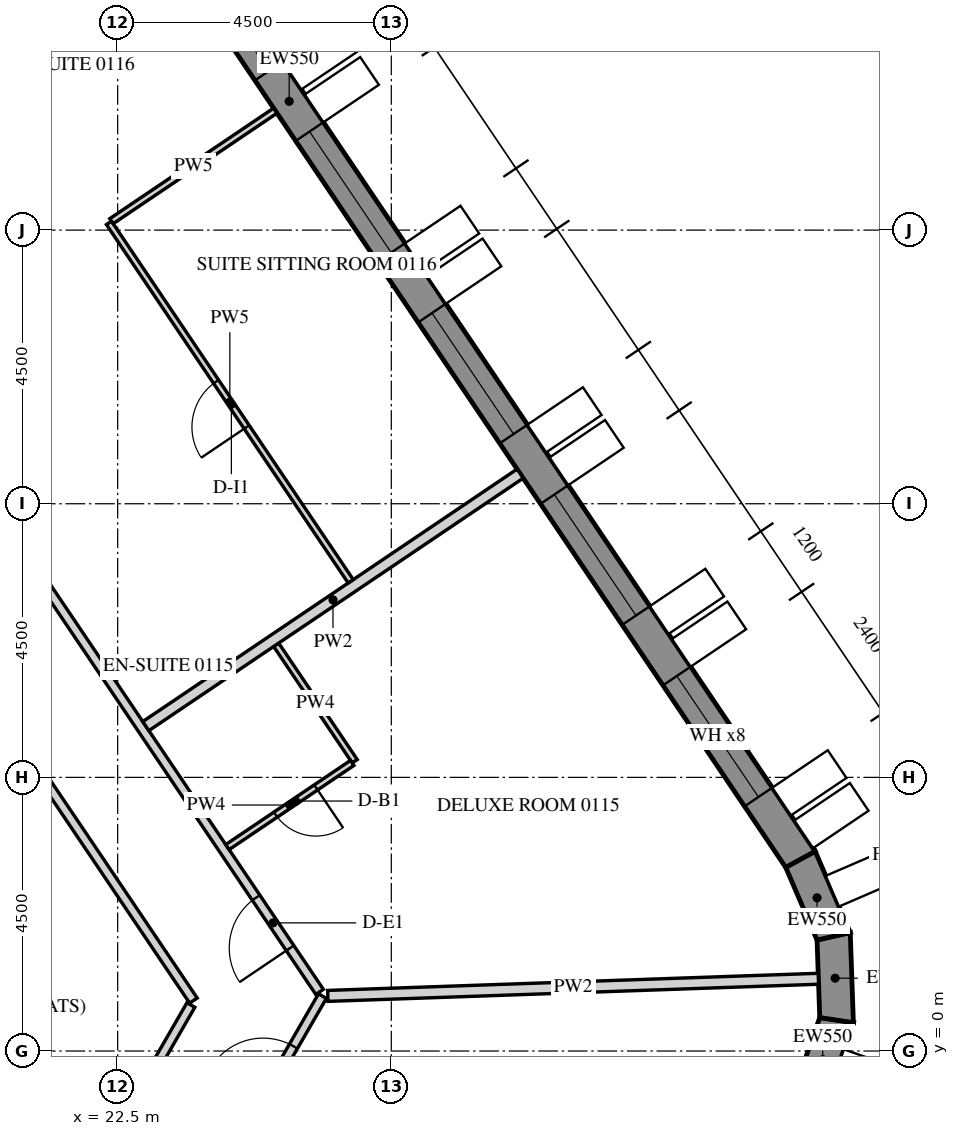
"""IFC4 building model, lengths in metres.
Left out: names, types, materials, properties, quantities, classifications, styles, units other than length and angle.
Written with IfcOpenShell. Run it as: python <this file> out.ifc"""

import sys

from ifc_helpers import new_model, si_unit, direction, frame, frame_2d, origin, place, context, subcontext, project, spatial, polyline, rectangle, outline, extrude, element, fill, save


model = new_model("IFC4")
c1 = context("Model", 3, precision=1e-05, world=origin(), true_north=direction((0.0, 1.0)))
c2 = subcontext(c1, "Body", "Model", "MODEL_VIEW")
j1 = project(units=[si_unit("LENGTHUNIT", "METRE"), si_unit("PLANEANGLEUNIT", "RADIAN")], contexts=[c1])
p1 = place(None, origin())
s1 = spatial("IfcSite", under=j1, at=p1, CompositionType="ELEMENT")
p2 = place(p1, origin())
s2 = spatial("IfcBuilding", under=s1, at=p2, CompositionType="ELEMENT")
p3 = place(p2, frame((0.0, 0.0, 37.5)))
s3 = spatial("IfcBuildingStorey", under=s2, at=p3, CompositionType="ELEMENT", Elevation=37.5)
p4 = place(p3, frame((33.866, -0.792, -0.15), z_axis=(0.0, 0.0, 1.0), x_axis=(0.33111537203, 0.943590276765, 0.0)))
e1 = element("IfcWall", 1, at=p4, inside=s3, PredefinedType="SOLIDWALL", context=c2, shape_type="SweptSolid", body=[
    extrude(outline(polyline([(-0.026, -0.275), (1.431, -0.275), (1.327, 0.275), (0.026, 0.275), (-0.026, -0.275)])), origin(), (0.0, 0.0, 1.0), 3.9),
])
p5 = place(p3, frame((34.323, 0.509, -0.15), z_axis=(0.0, 0.0, 1.0), x_axis=(-0.034876908462, 0.999391615562, 0.0)))
e2 = element("IfcWall", 2, at=p5, inside=s3, PredefinedType="SOLIDWALL", context=c2, shape_type="SweptSolid", body=[
    extrude(outline(polyline([(-0.052, -0.275), (1.431, -0.275), (1.327, 0.275), (0.052, 0.275), (-0.052, -0.275)])), origin(), (0.0, 0.0, 1.0), 3.9),
])
p6 = place(p3, frame((34.274, 1.887, -0.15), z_axis=(0.0, 0.0, 1.0), x_axis=(-0.396161342798, 0.918180913803, 0.0)))
e3 = element("IfcWall", 3, at=p6, inside=s3, PredefinedType="SOLIDWALL", context=c2, shape_type="SweptSolid", body=[
    extrude(outline(polyline([(-0.052, -0.275), (1.405, -0.275), (1.354, 0.275), (0.052, 0.275), (-0.052, -0.275)])), origin(), (0.0, 0.0, 1.0), 3.9),
])
p7 = place(p3, frame((33.728, 3.153, -0.15), z_axis=(0.0, 0.0, 1.0), x_axis=(-0.559192411416, 0.82903790445, 0.0)))
e4 = element("IfcWall", 4, at=p7, inside=s3, PredefinedType="SOLIDWALL", context=c2, shape_type="SweptSolid", body=[
    extrude(outline(polyline([(-0.026, -0.275), (30.093, -0.275), (30.048, 0.275), (0.026, 0.275), (-0.026, -0.275)])), origin(), (0.0, 0.0, 1.0), 3.9),
])
p8 = place(p7, frame((1.236, 0.0, 1.05)))
e5 = element("IfcOpeningElement", 5, at=p8, cuts=e4, PredefinedType="OPENING", context=c2, shape_type="SweptSolid", body=[
    extrude(rectangle(XDim=2.4, YDim=2.4, at=frame_2d((1.2, 1.2))), frame((0.0, 0.285, 0.0), z_axis=(0.0, -1.0, 0.0), x_axis=(1.0, 0.0, 0.0)), (0.0, 0.0, 1.0), 0.57),
])
p9 = place(p7, frame((4.835, 0.0, 1.05)))
e6 = element("IfcOpeningElement", 6, at=p9, cuts=e4, PredefinedType="OPENING", context=c2, shape_type="SweptSolid", body=[
    extrude(rectangle(XDim=2.4, YDim=2.4, at=frame_2d((1.2, 1.2))), frame((0.0, 0.285, 0.0), z_axis=(0.0, -1.0, 0.0), x_axis=(1.0, 0.0, 0.0)), (0.0, 0.0, 1.0), 0.57),
])
p10 = place(p7, frame((8.436, 0.0, 1.05)))
e7 = element("IfcOpeningElement", 7, at=p10, cuts=e4, PredefinedType="OPENING", context=c2, shape_type="SweptSolid", body=[
    extrude(rectangle(XDim=2.4, YDim=2.4, at=frame_2d((1.2, 1.2))), frame((0.0, 0.285, 0.0), z_axis=(0.0, -1.0, 0.0), x_axis=(1.0, 0.0, 0.0)), (0.0, 0.0, 1.0), 0.57),
])
p11 = place(p7, frame((12.035, 0.0, 1.05)))
e8 = element("IfcOpeningElement", 8, at=p11, cuts=e4, PredefinedType="OPENING", context=c2, shape_type="SweptSolid", body=[
    extrude(rectangle(XDim=2.4, YDim=2.4, at=frame_2d((1.2, 1.2))), frame((0.0, 0.285, 0.0), z_axis=(0.0, -1.0, 0.0), x_axis=(1.0, 0.0, 0.0)), (0.0, 0.0, 1.0), 0.57),
])
p12 = place(p7, frame((15.635, 0.0, 1.05)))
e9 = element("IfcOpeningElement", 9, at=p12, cuts=e4, PredefinedType="OPENING", context=c2, shape_type="SweptSolid", body=[
    extrude(rectangle(XDim=2.4, YDim=2.4, at=frame_2d((1.2, 1.2))), frame((0.0, 0.285, 0.0), z_axis=(0.0, -1.0, 0.0), x_axis=(1.0, 0.0, 0.0)), (0.0, 0.0, 1.0), 0.57),
])
p13 = place(p7, frame((19.236, 0.0, 1.05)))
e10 = element("IfcOpeningElement", 10, at=p13, cuts=e4, PredefinedType="OPENING", context=c2, shape_type="SweptSolid", body=[
    extrude(rectangle(XDim=2.4, YDim=2.4, at=frame_2d((1.2, 1.2))), frame((0.0, 0.285, 0.0), z_axis=(0.0, -1.0, 0.0), x_axis=(1.0, 0.0, 0.0)), (0.0, 0.0, 1.0), 0.57),
])
p14 = place(p7, frame((22.835, 0.0, 1.05)))
e11 = element("IfcOpeningElement", 11, at=p14, cuts=e4, PredefinedType="OPENING", context=c2, shape_type="SweptSolid", body=[
    extrude(rectangle(XDim=2.4, YDim=2.4, at=frame_2d((1.2, 1.2))), frame((0.0, 0.285, 0.0), z_axis=(0.0, -1.0, 0.0), x_axis=(1.0, 0.0, 0.0)), (0.0, 0.0, 1.0), 0.57),
])
p15 = place(p7, frame((26.436, 0.0, 1.05)))
e12 = element("IfcOpeningElement", 12, at=p15, cuts=e4, PredefinedType="OPENING", context=c2, shape_type="SweptSolid", body=[
    extrude(rectangle(XDim=2.4, YDim=2.4, at=frame_2d((1.2, 1.2))), frame((0.0, 0.285, 0.0), z_axis=(0.0, -1.0, 0.0), x_axis=(1.0, 0.0, 0.0)), (0.0, 0.0, 1.0), 0.57),
])
p16 = place(p3, frame((13.928, -19.775, 0.0), z_axis=(0.0, 0.0, 1.0), x_axis=(0.50000450071, 0.866022805283, 0.0)))
e13 = element("IfcWall", 13, at=p16, inside=s3, PredefinedType="PARTITIONING", context=c2, shape_type="SweptSolid", body=[
    extrude(rectangle(XDim=23.877, YDim=0.15, at=frame_2d((11.938, 0.0))), origin(), (0.0, 0.0, 1.0), 2.988),
])
p17 = place(p16, frame((8.573, 0.0, 0.0)))
e14 = element("IfcOpeningElement", 14, at=p17, cuts=e13, PredefinedType="OPENING", context=c2, shape_type="SweptSolid", body=[
    extrude(rectangle(XDim=1.0, YDim=2.1, at=frame_2d((0.5, 1.05))), frame((0.0, 0.085, 0.0), z_axis=(0.0, -1.0, 0.0), x_axis=(1.0, 0.0, 0.0)), (0.0, 0.0, 1.0), 0.17),
])
p18 = place(p16, frame((13.022, 0.0, 0.0)))
e15 = element("IfcOpeningElement", 15, at=p18, cuts=e13, PredefinedType="OPENING", context=c2, shape_type="SweptSolid", body=[
    extrude(rectangle(XDim=1.0, YDim=2.1, at=frame_2d((0.5, 1.05))), frame((0.0, 0.085, 0.0), z_axis=(0.0, -1.0, 0.0), x_axis=(1.0, 0.0, 0.0)), (0.0, 0.0, 1.0), 0.17),
])
p19 = place(p16, frame((21.925, 0.0, 0.0)))
e16 = element("IfcOpeningElement", 16, at=p19, cuts=e13, PredefinedType="OPENING", context=c2, shape_type="SweptSolid", body=[
    extrude(rectangle(XDim=1.0, YDim=2.1, at=frame_2d((0.5, 1.05))), frame((0.0, 0.085, 0.0), z_axis=(0.0, -1.0, 0.0), x_axis=(1.0, 0.0, 0.0)), (0.0, 0.0, 1.0), 0.17),
])
p20 = place(p3, frame((25.821, 0.972, 0.0), z_axis=(0.0, 0.0, 1.0), x_axis=(-0.559193816298, 0.829036956845, 0.0)))
e17 = element("IfcWall", 17, at=p20, inside=s3, PredefinedType="PARTITIONING", context=c2, shape_type="SweptSolid", body=[
    extrude(rectangle(XDim=22.002, YDim=0.15, at=frame_2d((11.001, 0.0))), origin(), (0.0, 0.0, 1.0), 2.988),
])
p21 = place(p20, frame((0.869, 0.0, 0.0)))
e18 = element("IfcOpeningElement", 18, at=p21, cuts=e17, PredefinedType="OPENING", context=c2, shape_type="SweptSolid", body=[
    extrude(rectangle(XDim=1.0, YDim=2.1, at=frame_2d((0.5, 1.05))), frame((0.0, 0.085, 0.0), z_axis=(0.0, -1.0, 0.0), x_axis=(1.0, 0.0, 0.0)), (0.0, 0.0, 1.0), 0.17),
])
p22 = place(p20, frame((10.721, 0.0, 0.0)))
e19 = element("IfcOpeningElement", 19, at=p22, cuts=e17, PredefinedType="OPENING", context=c2, shape_type="SweptSolid", body=[
    extrude(rectangle(XDim=1.0, YDim=2.1, at=frame_2d((0.5, 1.05))), frame((0.0, 0.085, 0.0), z_axis=(0.0, -1.0, 0.0), x_axis=(1.0, 0.0, 0.0)), (0.0, 0.0, 1.0), 0.17),
])
p23 = place(p3, frame((18.14, 9.141, 0.0), z_axis=(0.0, 0.0, 1.0), x_axis=(0.55918799196, -0.829040885389, 0.0)))
e20 = element("IfcWall", 20, at=p23, inside=s3, PredefinedType="PARTITIONING", context=c2, shape_type="SweptSolid", body=[
    extrude(rectangle(XDim=10.025, YDim=0.15, at=frame_2d((5.013, 0.0))), origin(), (0.0, 0.0, 1.0), 2.988),
])
p24 = place(p3, frame((23.704, 0.757, 0.0), z_axis=(0.0, 0.0, 1.0), x_axis=(-0.500010297365, -0.866019458516, 0.0)))
e21 = element("IfcWall", 21, at=p24, inside=s3, PredefinedType="PARTITIONING", context=c2, shape_type="SweptSolid", body=[
    extrude(rectangle(XDim=11.429, YDim=0.15, at=frame_2d((5.714, 0.0))), origin(), (0.0, 0.0, 1.0), 2.988),
])
p25 = place(p24, frame((5.264, 0.0, 0.0)))
e22 = element("IfcOpeningElement", 22, at=p25, cuts=e21, PredefinedType="OPENING", context=c2, shape_type="SweptSolid", body=[
    extrude(rectangle(XDim=0.9, YDim=2.1, at=frame_2d((0.45, 1.05))), frame((0.0, 0.085, 0.0), z_axis=(0.0, -1.0, 0.0), x_axis=(1.0, 0.0, 0.0)), (0.0, 0.0, 1.0), 0.17),
])
p26 = place(p3, frame((34.023, 1.188, 0.0), z_axis=(0.0, 0.0, 1.0), x_axis=(-0.999390818315, -0.03489974594, 0.0)))
e23 = element("IfcWall", 23, at=p26, inside=s3, PredefinedType="PARTITIONING", context=c2, shape_type="SweptSolid", body=[
    extrude(rectangle(XDim=8.073, YDim=0.18, at=frame_2d((4.036, 0.0))), origin(), (0.0, 0.0, 1.0), 2.988),
])
p27 = place(p3, frame((25.107, 6.68, 0.0), z_axis=(0.0, 0.0, 1.0), x_axis=(0.559204176839, -0.829029968461, 0.0)))
e24 = element("IfcWall", 24, at=p27, inside=s3, PredefinedType="PARTITIONING", context=c2, shape_type="SweptSolid", body=[
    extrude(rectangle(XDim=2.31, YDim=0.1, at=frame_2d((1.155, 0.0))), origin(), (0.0, 0.0, 1.0), 2.988),
])
p28 = place(p3, frame((26.357, 4.737, 0.0), z_axis=(0.0, 0.0, 1.0), x_axis=(-0.829094460354, -0.559108554585, 0.0)))
e25 = element("IfcWall", 25, at=p28, inside=s3, PredefinedType="PARTITIONING", context=c2, shape_type="SweptSolid", body=[
    extrude(rectangle(XDim=2.475, YDim=0.1, at=frame_2d((1.238, 0.0))), origin(), (0.0, 0.0, 1.0), 2.988),
])
p29 = place(p28, frame((0.72, 0.0, 0.0)))
e26 = element("IfcOpeningElement", 26, at=p29, cuts=e25, PredefinedType="OPENING", context=c2, shape_type="SweptSolid", body=[
    extrude(rectangle(XDim=0.8, YDim=2.1, at=frame_2d((0.4, 1.05))), frame((0.0, 0.06, 0.0), z_axis=(0.0, -1.0, 0.0), x_axis=(1.0, 0.0, 0.0)), (0.0, 0.0, 1.0), 0.12),
])
p30 = place(p3, frame((29.119, 9.495, 0.0), z_axis=(0.0, 0.0, 1.0), x_axis=(-0.829038452737, -0.559191598545, 0.0)))
e27 = element("IfcWall", 27, at=p30, inside=s3, PredefinedType="PARTITIONING", context=c2, shape_type="SweptSolid", body=[
    extrude(rectangle(XDim=7.425, YDim=0.18, at=frame_2d((3.713, 0.0))), origin(), (0.0, 0.0, 1.0), 2.988),
])
p31 = place(p3, frame((26.333, 7.724, 0.0), z_axis=(0.0, 0.0, 1.0), x_axis=(-0.559185029686, 0.829042883435, 0.0)))
e28 = element("IfcWall", 28, at=p31, inside=s3, PredefinedType="PARTITIONING", context=c2, shape_type="SweptSolid", body=[
    extrude(rectangle(XDim=7.11, YDim=0.1, at=frame_2d((3.555, 0.0))), origin(), (0.0, 0.0, 1.0), 2.988),
])
p32 = place(p31, frame((3.06, 0.0, 0.0)))
e29 = element("IfcOpeningElement", 29, at=p32, cuts=e28, PredefinedType="OPENING", context=c2, shape_type="SweptSolid", body=[
    extrude(rectangle(XDim=0.9, YDim=2.1, at=frame_2d((0.45, 1.05))), frame((0.0, 0.06, 0.0), z_axis=(0.0, -1.0, 0.0), x_axis=(1.0, 0.0, 0.0)), (0.0, 0.0, 1.0), 0.12),
])
p33 = place(p3, frame((22.398, 13.647, 0.0), z_axis=(0.0, 0.0, 1.0), x_axis=(0.829033253898, 0.55919930609, 0.0)))
e30 = element("IfcWall", 30, at=p33, inside=s3, PredefinedType="PARTITIONING", context=c2, shape_type="SweptSolid", body=[
    extrude(rectangle(XDim=3.25, YDim=0.1, at=frame_2d((1.625, 0.0))), origin(), (0.0, 0.0, 1.0), 2.988),
])
p34 = place(p8, frame((0.0, 0.205, 0.0)))
e31 = element("IfcWindow", 31, at=p34, inside=s3, PartitioningType="DOUBLE_PANEL_VERTICAL", PredefinedType="WINDOW", context=c2, shape_type="SweptSolid", body=[
    extrude(rectangle(XDim=2.4, YDim=2.4, at=frame_2d((1.2, 1.2))), frame((0.0, 0.03, 0.0), z_axis=(0.0, -1.0, 0.0), x_axis=(1.0, 0.0, 0.0)), (0.0, 0.0, 1.0), 0.06),
])
fill(e5, e31)
p35 = place(p9, frame((0.0, 0.205, 0.0)))
e32 = element("IfcWindow", 32, at=p35, inside=s3, PartitioningType="DOUBLE_PANEL_VERTICAL", PredefinedType="WINDOW", context=c2, shape_type="SweptSolid", body=[
    extrude(rectangle(XDim=2.4, YDim=2.4, at=frame_2d((1.2, 1.2))), frame((0.0, 0.03, 0.0), z_axis=(0.0, -1.0, 0.0), x_axis=(1.0, 0.0, 0.0)), (0.0, 0.0, 1.0), 0.06),
])
fill(e6, e32)
p36 = place(p10, frame((0.0, 0.205, 0.0)))
e33 = element("IfcWindow", 33, at=p36, inside=s3, PartitioningType="DOUBLE_PANEL_VERTICAL", PredefinedType="WINDOW", context=c2, shape_type="SweptSolid", body=[
    extrude(rectangle(XDim=2.4, YDim=2.4, at=frame_2d((1.2, 1.2))), frame((0.0, 0.03, 0.0), z_axis=(0.0, -1.0, 0.0), x_axis=(1.0, 0.0, 0.0)), (0.0, 0.0, 1.0), 0.06),
])
fill(e7, e33)
p37 = place(p11, frame((0.0, 0.205, 0.0)))
e34 = element("IfcWindow", 34, at=p37, inside=s3, PartitioningType="DOUBLE_PANEL_VERTICAL", PredefinedType="WINDOW", context=c2, shape_type="SweptSolid", body=[
    extrude(rectangle(XDim=2.4, YDim=2.4, at=frame_2d((1.2, 1.2))), frame((0.0, 0.03, 0.0), z_axis=(0.0, -1.0, 0.0), x_axis=(1.0, 0.0, 0.0)), (0.0, 0.0, 1.0), 0.06),
])
fill(e8, e34)
p38 = place(p12, frame((0.0, 0.205, 0.0)))
e35 = element("IfcWindow", 35, at=p38, inside=s3, PartitioningType="DOUBLE_PANEL_VERTICAL", PredefinedType="WINDOW", context=c2, shape_type="SweptSolid", body=[
    extrude(rectangle(XDim=2.4, YDim=2.4, at=frame_2d((1.2, 1.2))), frame((0.0, 0.03, 0.0), z_axis=(0.0, -1.0, 0.0), x_axis=(1.0, 0.0, 0.0)), (0.0, 0.0, 1.0), 0.06),
])
fill(e9, e35)
p39 = place(p19, origin())
e36 = element("IfcDoor", 36, at=p39, inside=s3, OperationType="SINGLE_SWING_RIGHT", PredefinedType="DOOR", context=c2, shape_type="SweptSolid", body=[
    extrude(rectangle(XDim=1.0, YDim=2.1, at=frame_2d((0.5, 1.05))), frame((0.0, 0.025, 0.0), z_axis=(0.0, -1.0, 0.0), x_axis=(1.0, 0.0, 0.0)), (0.0, 0.0, 1.0), 0.05),
])
fill(e16, e36)
p40 = place(p21, origin())
e37 = element("IfcDoor", 37, at=p40, inside=s3, OperationType="SINGLE_SWING_RIGHT", PredefinedType="DOOR", context=c2, shape_type="SweptSolid", body=[
    extrude(rectangle(XDim=1.0, YDim=2.1, at=frame_2d((0.5, 1.05))), frame((0.0, 0.025, 0.0), z_axis=(0.0, -1.0, 0.0), x_axis=(1.0, 0.0, 0.0)), (0.0, 0.0, 1.0), 0.05),
])
fill(e18, e37)
p41 = place(p29, origin())
e38 = element("IfcDoor", 38, at=p41, inside=s3, OperationType="SINGLE_SWING_RIGHT", PredefinedType="DOOR", context=c2, shape_type="SweptSolid", body=[
    extrude(rectangle(XDim=0.8, YDim=2.1, at=frame_2d((0.4, 1.05))), frame((0.0, 0.025, 0.0), z_axis=(0.0, -1.0, 0.0), x_axis=(1.0, 0.0, 0.0)), (0.0, 0.0, 1.0), 0.05),
])
fill(e26, e38)
p42 = place(p32, origin())
e39 = element("IfcDoor", 39, at=p42, inside=s3, OperationType="SINGLE_SWING_RIGHT", PredefinedType="DOOR", context=c2, shape_type="SweptSolid", body=[
    extrude(rectangle(XDim=0.9, YDim=2.1, at=frame_2d((0.45, 1.05))), frame((0.0, 0.025, 0.0), z_axis=(0.0, -1.0, 0.0), x_axis=(1.0, 0.0, 0.0)), (0.0, 0.0, 1.0), 0.05),
])
fill(e29, e39)
save(model, sys.argv[1])
